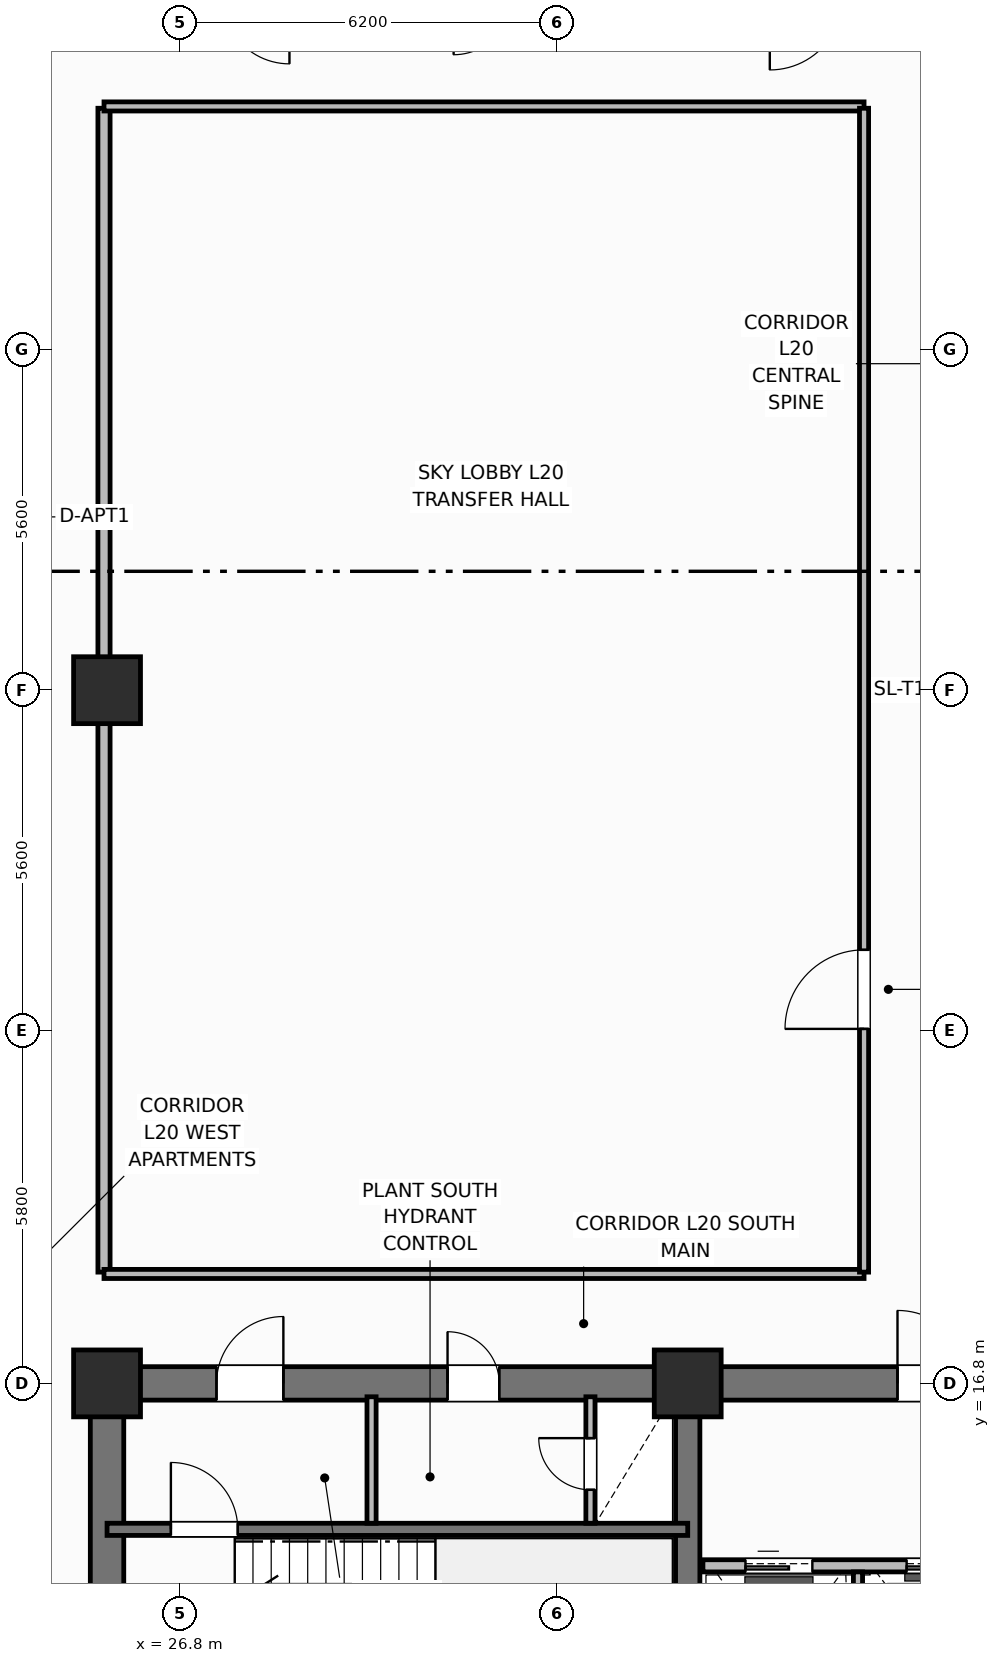
"""IFC4 building model, lengths in metres.
Left out: names, types, materials, properties, quantities, classifications, styles, units other than length and angle.
Written with IfcOpenShell. Run it as: python <this file> out.ifc"""

import sys

from ifc_helpers import new_model, si_unit, direction, frame, frame_2d, origin, origin_2d, place, context, subcontext, project, spatial, rectangle, extrude, element, fill, save


model = new_model("IFC4")
c1 = context("Model", 3, precision=1e-05, world=origin(), true_north=direction((0.0, 1.0)))
c2 = subcontext(c1, "Body", "Model", "MODEL_VIEW")
j1 = project(units=[si_unit("LENGTHUNIT", "METRE"), si_unit("PLANEANGLEUNIT", "RADIAN")], contexts=[c1])
p1 = place(None, origin())
s1 = spatial("IfcSite", under=j1, at=p1, CompositionType="ELEMENT")
p2 = place(p1, origin())
s2 = spatial("IfcBuilding", under=s1, at=p2, CompositionType="ELEMENT")
p3 = place(p2, frame((0.0, 0.0, 84.1)))
s3 = spatial("IfcBuildingStorey", under=s2, at=p3, CompositionType="ELEMENT", Elevation=84.1)
p4 = place(p3, frame((25.6, 10.875, 0.0), z_axis=(0.0, 0.0, 1.0), x_axis=(0.0, 1.0, 0.0)))
e1 = element("IfcWall", 1, at=p4, inside=s3, PredefinedType="SHEAR", context=c2, shape_type="SweptSolid", body=[
    extrude(rectangle(XDim=5.65, YDim=0.55, at=frame_2d((2.825, 0.0))), origin(), (0.0, 0.0, 1.0), 4.2),
])
p5 = place(p3, frame((25.6, 16.8, 0.0), z_axis=(0.0, 0.0, 1.0), x_axis=(1.0, 0.0, 0.0)))
e2 = element("IfcWall", 2, at=p5, inside=s3, PredefinedType="SHEAR", context=c2, shape_type="SweptSolid", body=[
    extrude(rectangle(XDim=27.2, YDim=0.55, at=frame_2d((13.6, 0.0))), origin(), (0.0, 0.0, 1.0), 4.2),
])
p6 = place(p5, frame((1.8, 0.0, 0.0)))
e3 = element("IfcOpeningElement", 3, at=p6, cuts=e2, PredefinedType="OPENING", context=c2, shape_type="SweptSolid", body=[
    extrude(rectangle(XDim=1.1, YDim=2.15, at=frame_2d((0.55, 1.075))), frame((0.0, 0.285, 0.0), z_axis=(0.0, -1.0, 0.0), x_axis=(1.0, 0.0, 0.0)), (0.0, 0.0, 1.0), 0.57),
])
p7 = place(p5, frame((5.6, 0.0, 0.0)))
e4 = element("IfcOpeningElement", 4, at=p7, cuts=e2, PredefinedType="OPENING", context=c2, shape_type="SweptSolid", body=[
    extrude(rectangle(XDim=0.85, YDim=2.1, at=frame_2d((0.425, 1.05))), frame((0.0, 0.285, 0.0), z_axis=(0.0, -1.0, 0.0), x_axis=(1.0, 0.0, 0.0)), (0.0, 0.0, 1.0), 0.57),
])
p8 = place(p5, frame((13.0, 0.0, 0.0)))
e5 = element("IfcOpeningElement", 5, at=p8, cuts=e2, PredefinedType="OPENING", context=c2, shape_type="SweptSolid", body=[
    extrude(rectangle(XDim=1.2, YDim=2.15, at=frame_2d((0.6, 1.075))), frame((0.0, 0.285, 0.0), z_axis=(0.0, -1.0, 0.0), x_axis=(1.0, 0.0, 0.0)), (0.0, 0.0, 1.0), 0.57),
])
p9 = place(p5, frame((20.4, 0.0, 0.0)))
e6 = element("IfcOpeningElement", 6, at=p9, cuts=e2, PredefinedType="OPENING", context=c2, shape_type="SweptSolid", body=[
    extrude(rectangle(XDim=1.3, YDim=2.2, at=frame_2d((0.65, 1.1))), frame((0.0, 0.285, 0.0), z_axis=(0.0, -1.0, 0.0), x_axis=(1.0, 0.0, 0.0)), (0.0, 0.0, 1.0), 0.57),
])
p10 = place(p5, frame((24.65, 0.0, 0.0)))
e7 = element("IfcOpeningElement", 7, at=p10, cuts=e2, PredefinedType="OPENING", context=c2, shape_type="SweptSolid", body=[
    extrude(rectangle(XDim=0.85, YDim=2.1, at=frame_2d((0.425, 1.05))), frame((0.0, 0.285, 0.0), z_axis=(0.0, -1.0, 0.0), x_axis=(1.0, 0.0, 0.0)), (0.0, 0.0, 1.0), 0.57),
])
p11 = place(p3, frame((35.15, 10.875, 0.0), z_axis=(0.0, 0.0, 1.0), x_axis=(0.0, 1.0, 0.0)))
e8 = element("IfcWall", 8, at=p11, inside=s3, PredefinedType="SHEAR", context=c2, shape_type="SweptSolid", body=[
    extrude(rectangle(XDim=5.65, YDim=0.4, at=frame_2d((2.825, 0.0))), origin(), (0.0, 0.0, 1.0), 4.2),
])
for number, where, z_axis, x_axis in (
    (9, (25.6, 16.8, 0.0), (0.0, 0.0, 1.0), (1.0, 0.0, 0.0)),
    (10, (35.15, 16.8, 0.0), (0.0, 0.0, 1.0), (1.0, 0.0, 0.0)),
    (11, (25.6, 28.2, 0.0), (0.0, 0.0, 1.0), (1.0, 0.0, 0.0)),
):
    element("IfcColumn", number, at=place(p3, frame(where, z_axis=z_axis, x_axis=x_axis)), inside=s3, PredefinedType="COLUMN", context=c2, shape_type="SweptSolid", body=[
        extrude(rectangle(XDim=1.1, YDim=1.1, at=origin_2d()), origin(), (0.0, 0.0, 1.0), 4.2),
    ])
p12 = place(p3, frame((25.6, 14.4, 0.0), z_axis=(0.0, 0.0, 1.0), x_axis=(1.0, 0.0, 0.0)))
e12 = element("IfcWall", 12, at=p12, inside=s3, PredefinedType="SHEAR", context=c2, shape_type="SweptSolid", body=[
    extrude(rectangle(XDim=9.55, YDim=0.2, at=frame_2d((4.775, 0.0))), origin(), (0.0, 0.0, 1.0), 4.2),
])
p13 = place(p12, frame((1.05, 0.0, 0.0)))
e13 = element("IfcOpeningElement", 13, at=p13, cuts=e12, PredefinedType="OPENING", context=c2, shape_type="SweptSolid", body=[
    extrude(rectangle(XDim=1.1, YDim=2.15, at=frame_2d((0.55, 1.075))), frame((0.0, 0.11, 0.0), z_axis=(0.0, -1.0, 0.0), x_axis=(1.0, 0.0, 0.0)), (0.0, 0.0, 1.0), 0.22),
])
p14 = place(p3, frame((29.95, 14.5, 0.0), z_axis=(0.0, 0.0, 1.0), x_axis=(0.0, 1.0, 0.0)))
e14 = element("IfcWall", 14, at=p14, inside=s3, PredefinedType="PARTITIONING", context=c2, shape_type="SweptSolid", body=[
    extrude(rectangle(XDim=2.08, YDim=0.15, at=frame_2d((1.04, 0.0))), origin(), (0.0, 0.0, 1.0), 3.03),
])
p15 = place(p3, frame((33.55, 14.5, 0.0), z_axis=(0.0, 0.0, 1.0), x_axis=(0.0, 1.0, 0.0)))
e15 = element("IfcWall", 15, at=p15, inside=s3, PredefinedType="PARTITIONING", context=c2, shape_type="SweptSolid", body=[
    extrude(rectangle(XDim=2.08, YDim=0.15, at=frame_2d((1.04, 0.0))), origin(), (0.0, 0.0, 1.0), 3.03),
])
p16 = place(p15, frame((0.55, 0.0, 0.0)))
e16 = element("IfcOpeningElement", 16, at=p16, cuts=e15, PredefinedType="OPENING", context=c2, shape_type="SweptSolid", body=[
    extrude(rectangle(XDim=0.85, YDim=2.05, at=frame_2d((0.425, 1.025))), frame((0.0, 0.085, 0.0), z_axis=(0.0, -1.0, 0.0), x_axis=(1.0, 0.0, 0.0)), (0.0, 0.0, 1.0), 0.17),
])
p17 = place(p3, frame((35.4, 13.8, 0.0), z_axis=(0.0, 0.0, 1.0), x_axis=(1.0, 0.0, 0.0)))
e17 = element("IfcWall", 17, at=p17, inside=s3, PredefinedType="PARTITIONING", context=c2, shape_type="SweptSolid", body=[
    extrude(rectangle(XDim=7.6, YDim=0.2, at=frame_2d((3.8, 0.0))), origin(), (0.0, 0.0, 1.0), 2.8),
])
p18 = place(p17, frame((0.7, 0.0, 0.0)))
e18 = element("IfcOpeningElement", 18, at=p18, cuts=e17, PredefinedType="OPENING", context=c2, shape_type="SweptSolid", body=[
    extrude(rectangle(XDim=1.1, YDim=2.15, at=frame_2d((0.55, 1.075))), frame((0.0, 0.11, 0.0), z_axis=(0.0, -1.0, 0.0), x_axis=(1.0, 0.0, 0.0)), (0.0, 0.0, 1.0), 0.22),
])
p19 = place(p17, frame((3.35, 0.0, 0.0)))
e19 = element("IfcOpeningElement", 19, at=p19, cuts=e17, PredefinedType="OPENING", context=c2, shape_type="SweptSolid", body=[
    extrude(rectangle(XDim=1.2, YDim=2.15, at=frame_2d((0.6, 1.075))), frame((0.0, 0.11, 0.0), z_axis=(0.0, -1.0, 0.0), x_axis=(1.0, 0.0, 0.0)), (0.0, 0.0, 1.0), 0.22),
])
p20 = place(p3, frame((37.95, 10.95, 0.0), z_axis=(0.0, 0.0, 1.0), x_axis=(0.0, 1.0, 0.0)))
e20 = element("IfcWall", 20, at=p20, inside=s3, PredefinedType="PARTITIONING", context=c2, shape_type="SweptSolid", body=[
    extrude(rectangle(XDim=2.75, YDim=0.15, at=frame_2d((1.375, 0.0))), origin(), (0.0, 0.0, 1.0), 3.03),
])
p21 = place(p3, frame((25.55, 18.63, 0.0), z_axis=(0.0, 0.0, 1.0), x_axis=(0.0, 1.0, 0.0)))
e21 = element("IfcWall", 21, at=p21, inside=s3, PredefinedType="PARTITIONING", context=c2, shape_type="SweptSolid", body=[
    extrude(rectangle(XDim=19.14, YDim=0.2, at=frame_2d((9.57, 0.0))), origin(), (0.0, 0.0, 1.0), 3.03),
])
for number, where, z_axis, x_axis in (
    (22, (25.55, 18.6, 0.0), (0.0, 0.0, 1.0), (1.0, 0.0, 0.0)),
    (23, (25.55, 37.8, 0.0), (0.0, 0.0, 1.0), (1.0, 0.0, 0.0)),
):
    element("IfcWall", number, at=place(p3, frame(where, z_axis=z_axis, x_axis=x_axis)), inside=s3, PredefinedType="PARTITIONING", context=c2, shape_type="SweptSolid", body=[
        extrude(rectangle(XDim=12.5, YDim=0.15, at=frame_2d((6.25, 0.0))), origin(), (0.0, 0.0, 1.0), 3.03),
    ])
p22 = place(p3, frame((38.05, 18.63, 0.0), z_axis=(0.0, 0.0, 1.0), x_axis=(0.0, 1.0, 0.0)))
e24 = element("IfcWall", 24, at=p22, inside=s3, PredefinedType="PARTITIONING", context=c2, shape_type="SweptSolid", body=[
    extrude(rectangle(XDim=19.14, YDim=0.15, at=frame_2d((9.57, 0.0))), origin(), (0.0, 0.0, 1.0), 3.03),
])
p23 = place(p22, frame((4.0, 0.0, 0.0)))
e25 = element("IfcOpeningElement", 25, at=p23, cuts=e24, PredefinedType="OPENING", context=c2, shape_type="SweptSolid", body=[
    extrude(rectangle(XDim=1.3, YDim=2.2, at=frame_2d((0.65, 1.1))), frame((0.0, 0.085, 0.0), z_axis=(0.0, -1.0, 0.0), x_axis=(1.0, 0.0, 0.0)), (0.0, 0.0, 1.0), 0.17),
])
p24 = place(p13, origin())
e26 = element("IfcDoor", 26, at=p24, inside=s3, OperationType="SINGLE_SWING_LEFT", PredefinedType="DOOR", context=c2, shape_type="SweptSolid", body=[
    extrude(rectangle(XDim=1.1, YDim=2.15, at=frame_2d((0.55, 1.075))), frame((0.0, 0.025, 0.0), z_axis=(0.0, -1.0, 0.0), x_axis=(1.0, 0.0, 0.0)), (0.0, 0.0, 1.0), 0.05),
])
fill(e13, e26)
p25 = place(p16, origin())
e27 = element("IfcDoor", 27, at=p25, inside=s3, OperationType="SINGLE_SWING_RIGHT", PredefinedType="TRAPDOOR", context=c2, shape_type="SweptSolid", body=[
    extrude(rectangle(XDim=0.85, YDim=2.05, at=frame_2d((0.425, 1.025))), frame((0.0, 0.025, 0.0), z_axis=(0.0, -1.0, 0.0), x_axis=(1.0, 0.0, 0.0)), (0.0, 0.0, 1.0), 0.05),
])
fill(e16, e27)
p26 = place(p18, origin())
e28 = element("IfcDoor", 28, at=p26, inside=s3, OperationType="SLIDING_TO_LEFT", PredefinedType="DOOR", context=c2, shape_type="SweptSolid", body=[
    extrude(rectangle(XDim=1.1, YDim=2.15, at=frame_2d((0.55, 1.075))), frame((0.0, 0.025, 0.0), z_axis=(0.0, -1.0, 0.0), x_axis=(1.0, 0.0, 0.0)), (0.0, 0.0, 1.0), 0.05),
])
fill(e18, e28)
p27 = place(p19, origin())
e29 = element("IfcDoor", 29, at=p27, inside=s3, OperationType="SLIDING_TO_LEFT", PredefinedType="DOOR", context=c2, shape_type="SweptSolid", body=[
    extrude(rectangle(XDim=1.2, YDim=2.15, at=frame_2d((0.6, 1.075))), frame((0.0, 0.025, 0.0), z_axis=(0.0, -1.0, 0.0), x_axis=(1.0, 0.0, 0.0)), (0.0, 0.0, 1.0), 0.05),
])
fill(e19, e29)
p28 = place(p23, origin())
e30 = element("IfcDoor", 30, at=p28, inside=s3, OperationType="SINGLE_SWING_LEFT", PredefinedType="DOOR", context=c2, shape_type="SweptSolid", body=[
    extrude(rectangle(XDim=1.3, YDim=2.2, at=frame_2d((0.65, 1.1))), frame((0.0, 0.025, 0.0), z_axis=(0.0, -1.0, 0.0), x_axis=(1.0, 0.0, 0.0)), (0.0, 0.0, 1.0), 0.05),
])
fill(e25, e30)
p29 = place(p6, origin())
e31 = element("IfcDoor", 31, at=p29, inside=s3, OperationType="SINGLE_SWING_RIGHT", PredefinedType="DOOR", context=c2, shape_type="SweptSolid", body=[
    extrude(rectangle(XDim=1.1, YDim=2.15, at=frame_2d((0.55, 1.075))), frame((0.0, 0.025, 0.0), z_axis=(0.0, -1.0, 0.0), x_axis=(1.0, 0.0, 0.0)), (0.0, 0.0, 1.0), 0.05),
])
fill(e3, e31)
p30 = place(p7, origin())
e32 = element("IfcDoor", 32, at=p30, inside=s3, OperationType="SINGLE_SWING_LEFT", PredefinedType="DOOR", context=c2, shape_type="SweptSolid", body=[
    extrude(rectangle(XDim=0.85, YDim=2.1, at=frame_2d((0.425, 1.05))), frame((0.0, 0.025, 0.0), z_axis=(0.0, -1.0, 0.0), x_axis=(1.0, 0.0, 0.0)), (0.0, 0.0, 1.0), 0.05),
])
fill(e4, e32)
p31 = place(p8, origin())
e33 = element("IfcDoor", 33, at=p31, inside=s3, OperationType="SINGLE_SWING_LEFT", PredefinedType="DOOR", context=c2, shape_type="SweptSolid", body=[
    extrude(rectangle(XDim=1.2, YDim=2.15, at=frame_2d((0.6, 1.075))), frame((0.0, 0.025, 0.0), z_axis=(0.0, -1.0, 0.0), x_axis=(1.0, 0.0, 0.0)), (0.0, 0.0, 1.0), 0.05),
])
fill(e5, e33)
save(model, sys.argv[1])
